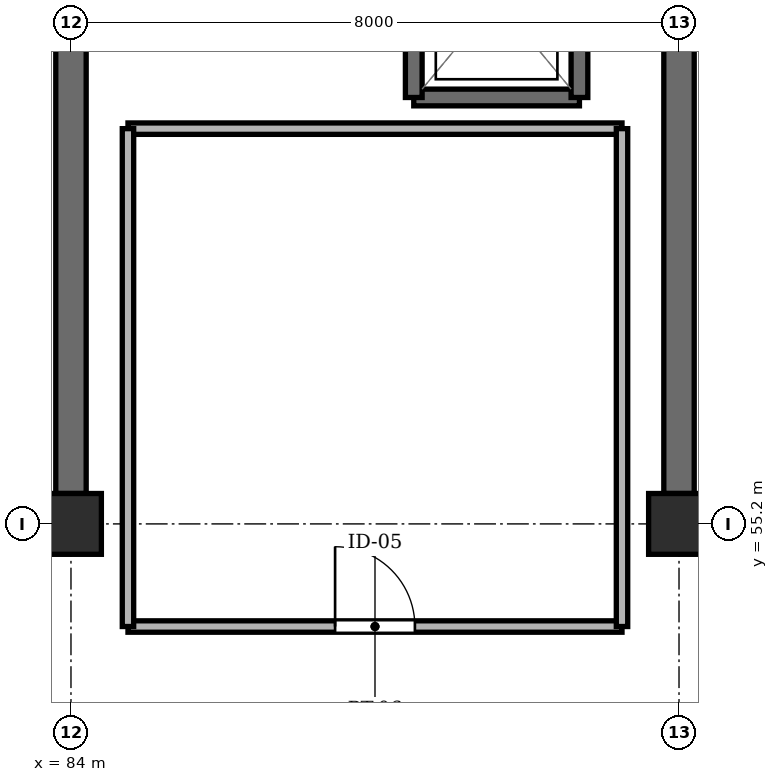
"""IFC4 building model, lengths in metres.
Left out: names, types, materials, properties, quantities, classifications, styles, units other than length and angle.
Written with IfcOpenShell. Run it as: python <this file> out.ifc"""

import sys

from ifc_helpers import new_model, si_unit, direction, frame, frame_2d, origin, origin_2d, place, context, subcontext, project, spatial, rectangle, extrude, element, fill, save


model = new_model("IFC4")
c1 = context("Model", 3, precision=1e-05, world=origin(), true_north=direction((0.0, 1.0)))
c2 = subcontext(c1, "Body", "Model", "MODEL_VIEW")
j1 = project(units=[si_unit("LENGTHUNIT", "METRE"), si_unit("PLANEANGLEUNIT", "RADIAN")], contexts=[c1])
p1 = place(None, origin())
s1 = spatial("IfcSite", under=j1, at=p1, CompositionType="ELEMENT")
p2 = place(p1, origin())
s2 = spatial("IfcBuilding", under=s1, at=p2, CompositionType="ELEMENT")
p3 = place(p2, frame((0.0, 0.0, 53.55)))
s3 = spatial("IfcBuildingStorey", under=s2, at=p3, CompositionType="ELEMENT", Elevation=53.55)
for number, where, z_axis, x_axis in (
    (1, (84.0, 55.2, -0.22), (0.0, 0.0, 1.0), (1.0, 0.0, 0.0)),
    (2, (92.0, 55.2, -0.22), (0.0, 0.0, 1.0), (1.0, 0.0, 0.0)),
):
    element("IfcColumn", number, at=place(p3, frame(where, z_axis=z_axis, x_axis=x_axis)), inside=s3, PredefinedType="COLUMN", context=c2, shape_type="SweptSolid", body=[
        extrude(rectangle(XDim=0.8, YDim=0.8, at=origin_2d()), origin(), (0.0, 0.0, 1.0), 3.25),
    ])
for number, where, z_axis, x_axis in (
    (3, (84.0, 55.6, 0.0), (0.0, 0.0, 1.0), (0.0, 1.0, 0.0)),
    (4, (92.0, 55.6, 0.0), (0.0, 0.0, 1.0), (0.0, 1.0, 0.0)),
):
    element("IfcWall", number, at=place(p3, frame(where, z_axis=z_axis, x_axis=x_axis)), inside=s3, PredefinedType="SHEAR", context=c2, shape_type="SweptSolid", body=[
        extrude(rectangle(XDim=6.45, YDim=0.4, at=frame_2d((3.225, 0.0))), origin(), (0.0, 0.0, 1.0), 3.03),
    ])
p4 = place(p3, frame((88.51, 60.81, 0.0), z_axis=(0.0, 0.0, 1.0), x_axis=(1.0, 0.0, 0.0)))
e5 = element("IfcWall", 5, at=p4, inside=s3, PredefinedType="SHEAR", context=c2, shape_type="SweptSolid", body=[
    extrude(rectangle(XDim=2.18, YDim=0.22, at=frame_2d((1.09, 0.0))), origin(), (0.0, 0.0, 1.0), 3.03),
])
for number, where, z_axis, x_axis in (
    (6, (88.51, 63.39, 0.0), (0.0, 0.0, 1.0), (0.0, -1.0, 0.0)),
    (7, (90.69, 60.81, 0.0), (0.0, 0.0, 1.0), (0.0, 1.0, 0.0)),
):
    element("IfcWall", number, at=place(p3, frame(where, z_axis=z_axis, x_axis=x_axis)), inside=s3, PredefinedType="SHEAR", context=c2, shape_type="SweptSolid", body=[
        extrude(rectangle(XDim=2.58, YDim=0.22, at=frame_2d((1.29, 0.0))), origin(), (0.0, 0.0, 1.0), 3.03),
    ])
p5 = place(p3, frame((84.75, 53.85, 0.0), z_axis=(0.0, 0.0, 1.0), x_axis=(1.0, 0.0, 0.0)))
e8 = element("IfcWall", 8, at=p5, inside=s3, PredefinedType="PARTITIONING", context=c2, shape_type="SweptSolid", body=[
    extrude(rectangle(XDim=6.5, YDim=0.15, at=frame_2d((3.25, 0.0))), origin(), (0.0, 0.0, 1.0), 2.53),
])
p6 = place(p5, frame((2.725, 0.0, 0.0)))
e9 = element("IfcOpeningElement", 9, at=p6, cuts=e8, PredefinedType="OPENING", context=c2, shape_type="SweptSolid", body=[
    extrude(rectangle(XDim=1.05, YDim=2.15, at=frame_2d((0.525, 1.075))), frame((0.0, 0.087, 0.0), z_axis=(0.0, -1.0, 0.0), x_axis=(1.0, 0.0, 0.0)), (0.0, 0.0, 1.0), 0.174),
])
p7 = place(p3, frame((84.75, 60.4, 0.0), z_axis=(0.0, 0.0, 1.0), x_axis=(1.0, 0.0, 0.0)))
e10 = element("IfcWall", 10, at=p7, inside=s3, PredefinedType="PARTITIONING", context=c2, shape_type="SweptSolid", body=[
    extrude(rectangle(XDim=6.5, YDim=0.15, at=frame_2d((3.25, 0.0))), origin(), (0.0, 0.0, 1.0), 2.53),
])
for number, where, z_axis, x_axis in (
    (11, (84.75, 53.85, 0.0), (0.0, 0.0, 1.0), (0.0, 1.0, 0.0)),
    (12, (91.25, 53.85, 0.0), (0.0, 0.0, 1.0), (0.0, 1.0, 0.0)),
):
    element("IfcWall", number, at=place(p3, frame(where, z_axis=z_axis, x_axis=x_axis)), inside=s3, PredefinedType="PARTITIONING", context=c2, shape_type="SweptSolid", body=[
        extrude(rectangle(XDim=6.55, YDim=0.15, at=frame_2d((3.275, 0.0))), origin(), (0.0, 0.0, 1.0), 2.53),
    ])
p8 = place(p6, origin())
e13 = element("IfcDoor", 13, at=p8, inside=s3, OperationType="SINGLE_SWING_LEFT", PredefinedType="DOOR", context=c2, shape_type="SweptSolid", body=[
    extrude(rectangle(XDim=1.05, YDim=2.15, at=frame_2d((0.525, 1.075))), frame((0.0, 0.025, 0.0), z_axis=(0.0, -1.0, 0.0), x_axis=(1.0, 0.0, 0.0)), (0.0, 0.0, 1.0), 0.05),
])
fill(e9, e13)
save(model, sys.argv[1])
